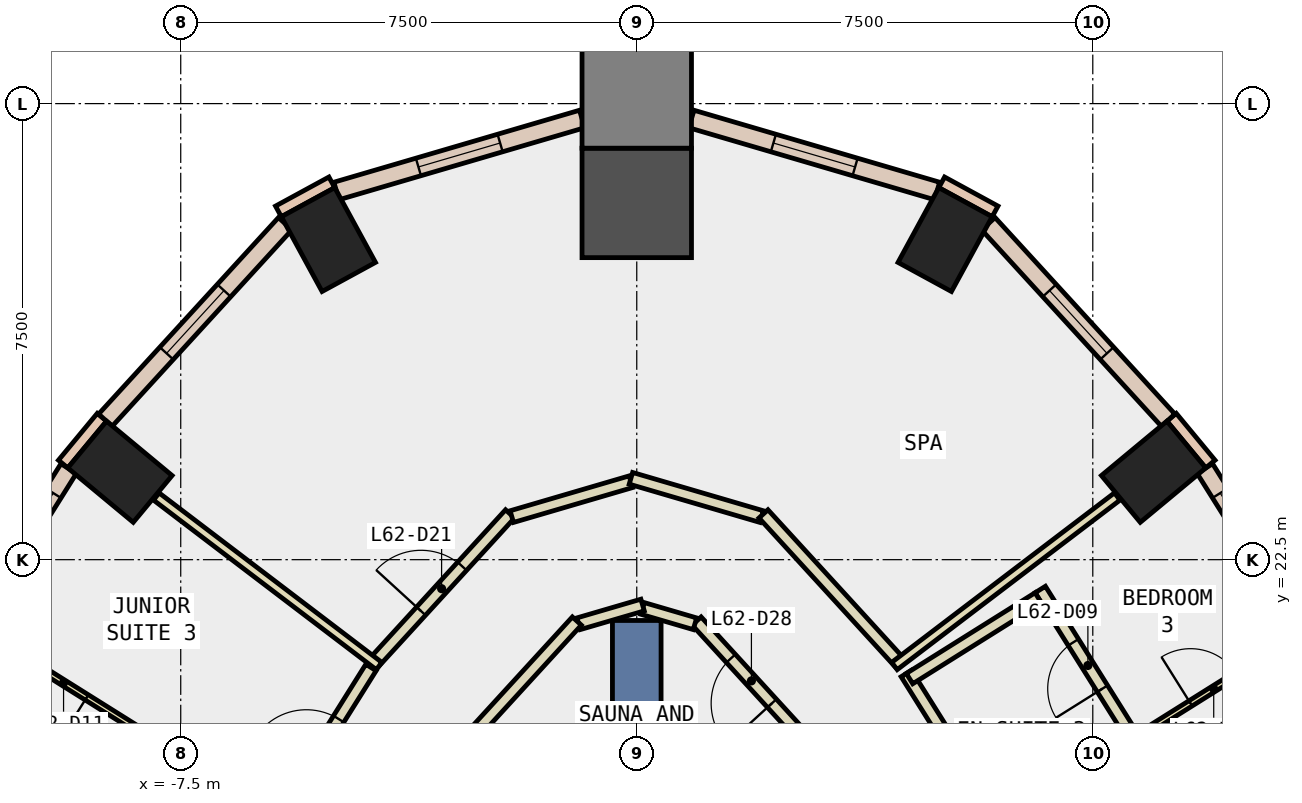
"""IFC4 building model, lengths in metres.
Left out: names, types, materials, properties, quantities, classifications, styles, units other than length and angle.
Written with IfcOpenShell. Run it as: python <this file> out.ifc"""

import sys

from ifc_helpers import new_model, si_unit, direction, frame, frame_2d, origin, origin_2d, place, context, subcontext, project, spatial, rectangle, extrude, element, fill, save


model = new_model("IFC4")
c1 = context("Model", 3, precision=1e-05, world=origin(), true_north=direction((0.0, 1.0)))
c2 = subcontext(c1, "Body", "Model", "MODEL_VIEW")
j1 = project(units=[si_unit("LENGTHUNIT", "METRE"), si_unit("PLANEANGLEUNIT", "RADIAN")], contexts=[c1])
p1 = place(None, origin())
s1 = spatial("IfcSite", under=j1, at=p1, CompositionType="ELEMENT")
p2 = place(p1, origin())
s2 = spatial("IfcBuilding", under=s1, at=p2, CompositionType="ELEMENT")
p3 = place(p2, frame((0.0, 0.0, 270.2)))
s3 = spatial("IfcBuildingStorey", under=s2, at=p3, CompositionType="ELEMENT", Elevation=270.2)
for number, where, z_axis, x_axis in (
    (1, (8.5, 23.946, -0.34), (0.0, 0.0, 1.0), (-0.639, 0.769, 0.0)),
    (2, (5.071, 27.764, -0.34), (0.0, 0.0, 1.0), (-0.878, 0.478, 0.0)),
):
    element("IfcColumn", number, at=place(p3, frame(where, z_axis=z_axis, x_axis=x_axis)), inside=s3, PredefinedType="COLUMN", context=c2, shape_type="SweptSolid", body=[
        extrude(rectangle(XDim=1.0, YDim=1.4, at=origin_2d()), origin(), (0.0, 0.0, 1.0), 3.6),
    ])
p4 = place(p3, frame((0.0, 28.367, -0.34), z_axis=(0.0, 0.0, 1.0), x_axis=(0.0, 1.0, 0.0)))
e3 = element("IfcColumn", 3, at=p4, inside=s3, PredefinedType="COLUMN", context=c2, shape_type="SweptSolid", body=[
    extrude(rectangle(XDim=1.8, YDim=1.8, at=origin_2d()), origin(), (0.0, 0.0, 1.0), 3.6),
])
for number, where, z_axis, x_axis in (
    (4, (-5.071, 27.764, -0.34), (0.0, 0.0, 1.0), (0.878, 0.478, 0.0)),
    (5, (-8.5, 23.946, -0.34), (0.0, 0.0, 1.0), (0.639, 0.769, 0.0)),
):
    element("IfcColumn", number, at=place(p3, frame(where, z_axis=z_axis, x_axis=x_axis)), inside=s3, PredefinedType="COLUMN", context=c2, shape_type="SweptSolid", body=[
        extrude(rectangle(XDim=1.0, YDim=1.4, at=origin_2d()), origin(), (0.0, 0.0, 1.0), 3.6),
    ])
p5 = place(p3, frame((0.0, 30.167, -0.34), z_axis=(0.0, 0.0, 1.0), x_axis=(0.0, 1.0, 0.0)))
e6 = element("IfcColumn", 6, at=p5, inside=s3, PredefinedType="COLUMN", context=c2, shape_type="SweptSolid", body=[
    extrude(rectangle(XDim=1.8, YDim=1.8, at=origin_2d()), origin(), (0.0, 0.0, 1.0), 3.6),
])
p6 = place(p3, frame((0.0, 12.5, -0.34), z_axis=(0.0, 0.0, 1.0), x_axis=(0.0, 1.0, 0.0)))
e7 = element("IfcWall", 7, at=p6, inside=s3, PredefinedType="SHEAR", context=c2, shape_type="SweptSolid", body=[
    extrude(rectangle(XDim=9.0, YDim=0.8, at=frame_2d((4.5, 0.0))), origin(), (0.0, 0.0, 1.0), 3.6),
])
for number, where, z_axis, x_axis in (
    (8, (5.893, 28.227, 0.0), (0.0, 0.0, 1.0), (-0.878, 0.478, 0.0)),
    (9, (-5.015, 28.705, 0.0), (0.0, 0.0, 1.0), (-0.878, -0.478, 0.0)),
):
    element("IfcWall", number, at=place(p3, frame(where, z_axis=z_axis, x_axis=x_axis)), inside=s3, PredefinedType="STANDARD", context=c2, shape_type="SweptSolid", body=[
        extrude(rectangle(XDim=1.0, YDim=0.2, at=frame_2d((0.5, 0.0))), origin(), (0.0, 0.0, 1.0), 3.26),
    ])
for number, where, z_axis, x_axis in (
    (10, (9.434, 24.072, 0.0), (0.0, 0.0, 1.0), (-0.638, 0.77, 0.0)),
    (11, (-8.796, 24.842, 0.0), (0.0, 0.0, 1.0), (-0.638, -0.77, 0.0)),
):
    element("IfcWall", number, at=place(p3, frame(where, z_axis=z_axis, x_axis=x_axis)), inside=s3, PredefinedType="STANDARD", context=c2, shape_type="SweptSolid", body=[
        extrude(rectangle(XDim=1.0, YDim=0.2, at=frame_2d((0.5, 0.0))), origin(), (0.0, 0.0, 1.0), 3.26),
    ])
p7 = place(p3, frame((12.372, 19.166, 0.0), z_axis=(0.0, 0.0, 1.0), x_axis=(-0.531137483242, 0.847285650708, 0.0)))
e12 = element("IfcWall", 12, at=p7, inside=s3, PredefinedType="STANDARD", context=c2, shape_type="SweptSolid", body=[
    extrude(rectangle(XDim=5.703, YDim=0.3, at=frame_2d((2.852, 0.0))), origin(), (0.0, 0.0, 1.0), 3.26),
])
p8 = place(p7, frame((0.476, 0.0, 0.9)))
e13 = element("IfcOpeningElement", 13, at=p8, cuts=e12, PredefinedType="OPENING", context=c2, shape_type="SweptSolid", body=[
    extrude(rectangle(XDim=1.9, YDim=2.0, at=frame_2d((0.95, 1.0))), frame((0.0, 0.16, 0.0), z_axis=(0.0, -1.0, 0.0), x_axis=(1.0, 0.0, 0.0)), (0.0, 0.0, 1.0), 0.32),
])
p9 = place(p7, frame((3.327, 0.0, 0.9)))
e14 = element("IfcOpeningElement", 14, at=p9, cuts=e12, PredefinedType="OPENING", context=c2, shape_type="SweptSolid", body=[
    extrude(rectangle(XDim=1.9, YDim=2.0, at=frame_2d((0.95, 1.0))), frame((0.0, 0.16, 0.0), z_axis=(0.0, -1.0, 0.0), x_axis=(1.0, 0.0, 0.0)), (0.0, 0.0, 1.0), 0.32),
])
p10 = place(p3, frame((8.739, 24.794, 0.0), z_axis=(0.0, 0.0, 1.0), x_axis=(-0.675143863554, 0.737686087374, 0.0)))
e15 = element("IfcWall", 15, at=p10, inside=s3, PredefinedType="STANDARD", context=c2, shape_type="SweptSolid", body=[
    extrude(rectangle(XDim=4.38, YDim=0.3, at=frame_2d((2.19, 0.0))), origin(), (0.0, 0.0, 1.0), 3.26),
])
p11 = place(p10, frame((1.49, 0.0, 0.9)))
e16 = element("IfcOpeningElement", 16, at=p11, cuts=e15, PredefinedType="OPENING", context=c2, shape_type="SweptSolid", body=[
    extrude(rectangle(XDim=1.4, YDim=2.0, at=frame_2d((0.7, 1.0))), frame((0.0, 0.16, 0.0), z_axis=(0.0, -1.0, 0.0), x_axis=(1.0, 0.0, 0.0)), (0.0, 0.0, 1.0), 0.32),
])
p12 = place(p3, frame((4.939, 28.563, 0.0), z_axis=(0.0, 0.0, 1.0), x_axis=(-0.959632861734, 0.281255703373, 0.0)))
e17 = element("IfcWall", 17, at=p12, inside=s3, PredefinedType="STANDARD", context=c2, shape_type="SweptSolid", body=[
    extrude(rectangle(XDim=4.21, YDim=0.3, at=frame_2d((2.105, 0.0))), origin(), (0.0, 0.0, 1.0), 3.26),
])
p13 = place(p12, frame((1.405, 0.0, 0.9)))
e18 = element("IfcOpeningElement", 18, at=p13, cuts=e17, PredefinedType="OPENING", context=c2, shape_type="SweptSolid", body=[
    extrude(rectangle(XDim=1.4, YDim=2.0, at=frame_2d((0.7, 1.0))), frame((0.0, 0.16, 0.0), z_axis=(0.0, -1.0, 0.0), x_axis=(1.0, 0.0, 0.0)), (0.0, 0.0, 1.0), 0.32),
])
p14 = place(p3, frame((-0.899, 29.747, 0.0), z_axis=(0.0, 0.0, 1.0), x_axis=(-0.959632861734, -0.281255703373, 0.0)))
e19 = element("IfcWall", 19, at=p14, inside=s3, PredefinedType="STANDARD", context=c2, shape_type="SweptSolid", body=[
    extrude(rectangle(XDim=4.21, YDim=0.3, at=frame_2d((2.105, 0.0))), origin(), (0.0, 0.0, 1.0), 3.26),
])
p15 = place(p14, frame((1.405, 0.0, 0.9)))
e20 = element("IfcOpeningElement", 20, at=p15, cuts=e19, PredefinedType="OPENING", context=c2, shape_type="SweptSolid", body=[
    extrude(rectangle(XDim=1.4, YDim=2.0, at=frame_2d((0.7, 1.0))), frame((0.0, 0.16, 0.0), z_axis=(0.0, -1.0, 0.0), x_axis=(1.0, 0.0, 0.0)), (0.0, 0.0, 1.0), 0.32),
])
p16 = place(p3, frame((-5.782, 28.025, 0.0), z_axis=(0.0, 0.0, 1.0), x_axis=(-0.675143863554, -0.737686087374, 0.0)))
e21 = element("IfcWall", 21, at=p16, inside=s3, PredefinedType="STANDARD", context=c2, shape_type="SweptSolid", body=[
    extrude(rectangle(XDim=4.38, YDim=0.3, at=frame_2d((2.19, 0.0))), origin(), (0.0, 0.0, 1.0), 3.26),
])
p17 = place(p16, frame((1.49, 0.0, 0.9)))
e22 = element("IfcOpeningElement", 22, at=p17, cuts=e21, PredefinedType="OPENING", context=c2, shape_type="SweptSolid", body=[
    extrude(rectangle(XDim=1.4, YDim=2.0, at=frame_2d((0.7, 1.0))), frame((0.0, 0.16, 0.0), z_axis=(0.0, -1.0, 0.0), x_axis=(1.0, 0.0, 0.0)), (0.0, 0.0, 1.0), 0.32),
])
p18 = place(p3, frame((-9.343, 23.998, 0.0), z_axis=(0.0, 0.0, 1.0), x_axis=(-0.531137483242, -0.847285650708, 0.0)))
e23 = element("IfcWall", 23, at=p18, inside=s3, PredefinedType="STANDARD", context=c2, shape_type="SweptSolid", body=[
    extrude(rectangle(XDim=5.703, YDim=0.3, at=frame_2d((2.852, 0.0))), origin(), (0.0, 0.0, 1.0), 3.26),
])
p19 = place(p18, frame((0.476, 0.0, 0.9)))
e24 = element("IfcOpeningElement", 24, at=p19, cuts=e23, PredefinedType="OPENING", context=c2, shape_type="SweptSolid", body=[
    extrude(rectangle(XDim=1.9, YDim=2.0, at=frame_2d((0.95, 1.0))), frame((0.0, 0.16, 0.0), z_axis=(0.0, -1.0, 0.0), x_axis=(1.0, 0.0, 0.0)), (0.0, 0.0, 1.0), 0.32),
])
p20 = place(p18, frame((3.327, 0.0, 0.9)))
e25 = element("IfcOpeningElement", 25, at=p20, cuts=e23, PredefinedType="OPENING", context=c2, shape_type="SweptSolid", body=[
    extrude(rectangle(XDim=1.9, YDim=2.0, at=frame_2d((0.95, 1.0))), frame((0.0, 0.16, 0.0), z_axis=(0.0, -1.0, 0.0), x_axis=(1.0, 0.0, 0.0)), (0.0, 0.0, 1.0), 0.32),
])
p21 = place(p3, frame((2.787, 19.522, 0.0), z_axis=(0.0, 0.0, 1.0), x_axis=(-0.675132105979, 0.73769684795, 0.0)))
e26 = element("IfcWall", 26, at=p21, inside=s3, PredefinedType="PARTITIONING", context=c2, shape_type="SweptSolid", body=[
    extrude(rectangle(XDim=2.669, YDim=0.2, at=frame_2d((1.334, 0.0))), origin(), (0.0, 0.0, 1.0), 3.26),
])
p22 = place(p21, frame((0.835, 0.0, 0.0)))
e27 = element("IfcOpeningElement", 27, at=p22, cuts=e26, PredefinedType="OPENING", context=c2, shape_type="SweptSolid", body=[
    extrude(rectangle(XDim=1.0, YDim=2.1, at=frame_2d((0.5, 1.05))), frame((0.0, 0.11, 0.0), z_axis=(0.0, -1.0, 0.0), x_axis=(1.0, 0.0, 0.0)), (0.0, 0.0, 1.0), 0.22),
])
p23 = place(p3, frame((0.957, 21.446, 0.0), z_axis=(0.0, 0.0, 1.0), x_axis=(-0.959758875404, 0.28082539252, 0.0)))
e28 = element("IfcWall", 28, at=p23, inside=s3, PredefinedType="PARTITIONING", context=c2, shape_type="SweptSolid", body=[
    extrude(rectangle(XDim=0.897, YDim=0.2, at=frame_2d((0.449, 0.0))), origin(), (0.0, 0.0, 1.0), 3.26),
])
p24 = place(p3, frame((0.096, 21.754, 0.0), z_axis=(0.0, 0.0, 1.0), x_axis=(-0.959817848073, -0.280623766849, 0.0)))
e29 = element("IfcWall", 29, at=p24, inside=s3, PredefinedType="PARTITIONING", context=c2, shape_type="SweptSolid", body=[
    extrude(rectangle(XDim=1.097, YDim=0.2, at=frame_2d((0.549, 0.0))), origin(), (0.0, 0.0, 1.0), 3.26),
])
p25 = place(p3, frame((-0.985, 21.491, 0.0), z_axis=(0.0, 0.0, 1.0), x_axis=(-0.675132105979, -0.73769684795, 0.0)))
e30 = element("IfcWall", 30, at=p25, inside=s3, PredefinedType="PARTITIONING", context=c2, shape_type="SweptSolid", body=[
    extrude(rectangle(XDim=2.669, YDim=0.2, at=frame_2d((1.334, 0.0))), origin(), (0.0, 0.0, 1.0), 3.26),
])
p26 = place(p3, frame((4.433, 20.628, 0.0), z_axis=(0.0, 0.0, 1.0), x_axis=(0.531135189756, -0.84728708842, 0.0)))
e31 = element("IfcWall", 31, at=p26, inside=s3, PredefinedType="PARTITIONING", context=c2, shape_type="SweptSolid", body=[
    extrude(rectangle(XDim=2.799, YDim=0.2, at=frame_2d((1.4, 0.0))), origin(), (0.0, 0.0, 1.0), 3.26),
])
p27 = place(p3, frame((-4.335, 20.793, 0.0), z_axis=(0.0, 0.0, 1.0), x_axis=(0.675074517272, 0.737749548377, 0.0)))
e32 = element("IfcWall", 32, at=p27, inside=s3, PredefinedType="PARTITIONING", context=c2, shape_type="SweptSolid", body=[
    extrude(rectangle(XDim=3.334, YDim=0.2, at=frame_2d((1.667, 0.0))), origin(), (0.0, 0.0, 1.0), 3.26),
])
p28 = place(p27, frame((1.167, 0.0, 0.0)))
e33 = element("IfcOpeningElement", 33, at=p28, cuts=e32, PredefinedType="OPENING", context=c2, shape_type="SweptSolid", body=[
    extrude(rectangle(XDim=1.0, YDim=2.1, at=frame_2d((0.5, 1.05))), frame((0.0, 0.11, 0.0), z_axis=(0.0, -1.0, 0.0), x_axis=(1.0, 0.0, 0.0)), (0.0, 0.0, 1.0), 0.22),
])
p29 = place(p3, frame((-2.055, 23.208, 0.0), z_axis=(0.0, 0.0, 1.0), x_axis=(0.959656367963, 0.281175488669, 0.0)))
e34 = element("IfcWall", 34, at=p29, inside=s3, PredefinedType="PARTITIONING", context=c2, shape_type="SweptSolid", body=[
    extrude(rectangle(XDim=2.041, YDim=0.2, at=frame_2d((1.021, 0.0))), origin(), (0.0, 0.0, 1.0), 3.26),
])
p30 = place(p3, frame((-0.096, 23.838, 0.0), z_axis=(0.0, 0.0, 1.0), x_axis=(0.959694419707, -0.281045584886, 0.0)))
e35 = element("IfcWall", 35, at=p30, inside=s3, PredefinedType="PARTITIONING", context=c2, shape_type="SweptSolid", body=[
    extrude(rectangle(XDim=2.241, YDim=0.2, at=frame_2d((1.121, 0.0))), origin(), (0.0, 0.0, 1.0), 3.26),
])
p31 = place(p3, frame((2.084, 23.253, 0.0), z_axis=(0.0, 0.0, 1.0), x_axis=(0.675074517272, -0.737749548377, 0.0)))
e36 = element("IfcWall", 36, at=p31, inside=s3, PredefinedType="PARTITIONING", context=c2, shape_type="SweptSolid", body=[
    extrude(rectangle(XDim=3.334, YDim=0.2, at=frame_2d((1.667, 0.0))), origin(), (0.0, 0.0, 1.0), 3.26),
])
p32 = place(p3, frame((-5.965, 18.185, 0.0), z_axis=(0.0, 0.0, 1.0), x_axis=(0.531256372055, 0.847211111324, 0.0)))
e37 = element("IfcWall", 37, at=p32, inside=s3, PredefinedType="PARTITIONING", context=c2, shape_type="SweptSolid", body=[
    extrude(rectangle(XDim=3.0, YDim=0.2, at=frame_2d((1.5, 0.0))), origin(), (0.0, 0.0, 1.0), 3.26),
])
p33 = place(p32, frame((1.0, 0.0, 0.0)))
e38 = element("IfcOpeningElement", 38, at=p33, cuts=e37, PredefinedType="OPENING", context=c2, shape_type="SweptSolid", body=[
    extrude(rectangle(XDim=1.0, YDim=2.1, at=frame_2d((0.5, 1.05))), frame((0.0, 0.11, 0.0), z_axis=(0.0, -1.0, 0.0), x_axis=(1.0, 0.0, 0.0)), (0.0, 0.0, 1.0), 0.22),
])
p34 = place(p3, frame((8.091, 19.499, 0.0), z_axis=(0.0, 0.0, 1.0), x_axis=(0.847249319986, 0.53119543464, 0.0)))
e39 = element("IfcWall", 39, at=p34, inside=s3, PredefinedType="PARTITIONING", context=c2, shape_type="SweptSolid", body=[
    extrude(rectangle(XDim=3.3, YDim=0.1, at=frame_2d((1.65, 0.0))), origin(), (0.0, 0.0, 1.0), 3.26),
])
p35 = place(p34, frame((1.2, 0.0, 0.0)))
e40 = element("IfcOpeningElement", 40, at=p35, cuts=e39, PredefinedType="OPENING", context=c2, shape_type="SweptSolid", body=[
    extrude(rectangle(XDim=0.9, YDim=2.1, at=frame_2d((0.45, 1.05))), frame((0.0, 0.06, 0.0), z_axis=(0.0, -1.0, 0.0), x_axis=(1.0, 0.0, 0.0)), (0.0, 0.0, 1.0), 0.12),
])
p36 = place(p3, frame((8.203, 19.51, 0.0), z_axis=(0.0, 0.0, 1.0), x_axis=(-0.531218552952, 0.847234825181, 0.0)))
e41 = element("IfcWall", 41, at=p36, inside=s3, PredefinedType="PARTITIONING", context=c2, shape_type="SweptSolid", body=[
    extrude(rectangle(XDim=2.95, YDim=0.2, at=frame_2d((1.475, 0.0))), origin(), (0.0, 0.0, 1.0), 3.26),
])
p37 = place(p36, frame((1.025, 0.0, 0.0)))
e42 = element("IfcOpeningElement", 42, at=p37, cuts=e41, PredefinedType="OPENING", context=c2, shape_type="SweptSolid", body=[
    extrude(rectangle(XDim=0.9, YDim=2.1, at=frame_2d((0.45, 1.05))), frame((0.0, 0.11, 0.0), z_axis=(0.0, -1.0, 0.0), x_axis=(1.0, 0.0, 0.0)), (0.0, 0.0, 1.0), 0.22),
])
p38 = place(p3, frame((6.604, 21.871, 0.0), z_axis=(0.0, 0.0, 1.0), x_axis=(-0.847377617561, -0.530990746866, 0.0)))
e43 = element("IfcWall", 43, at=p38, inside=s3, PredefinedType="PARTITIONING", context=c2, shape_type="SweptSolid", body=[
    extrude(rectangle(XDim=2.499, YDim=0.2, at=frame_2d((1.25, 0.0))), origin(), (0.0, 0.0, 1.0), 3.26),
])
for number, where, z_axis, x_axis in (
    (44, (4.238, 20.751, 0.0), (0.0, 0.0, 1.0), (0.796, 0.606, 0.0)),
    (45, (-4.238, 20.751, 0.0), (0.0, 0.0, 1.0), (-0.796, 0.606, 0.0)),
):
    element("IfcWall", number, at=place(p3, frame(where, z_axis=z_axis, x_axis=x_axis)), inside=s3, PredefinedType="PARTITIONING", context=c2, shape_type="SweptSolid", body=[
        extrude(rectangle(XDim=4.604, YDim=0.15, at=frame_2d((2.302, 0.0))), origin(), (0.0, 0.0, 1.0), 3.26),
    ])
p39 = place(p3, frame((-8.029, 19.598, 0.0), z_axis=(0.0, 0.0, 1.0), x_axis=(-0.847216023371, 0.531248538581, 0.0)))
e46 = element("IfcWall", 46, at=p39, inside=s3, PredefinedType="PARTITIONING", context=c2, shape_type="SweptSolid", body=[
    extrude(rectangle(XDim=3.3, YDim=0.1, at=frame_2d((1.65, 0.0))), origin(), (0.0, 0.0, 1.0), 3.26),
])
p40 = place(p39, frame((1.2, 0.0, 0.0)))
e47 = element("IfcOpeningElement", 47, at=p40, cuts=e46, PredefinedType="OPENING", context=c2, shape_type="SweptSolid", body=[
    extrude(rectangle(XDim=0.9, YDim=2.1, at=frame_2d((0.45, 1.05))), frame((0.0, 0.06, 0.0), z_axis=(0.0, -1.0, 0.0), x_axis=(1.0, 0.0, 0.0)), (0.0, 0.0, 1.0), 0.12),
])
p41 = place(p9, origin())
e48 = element("IfcWindow", 48, at=p41, inside=s3, PartitioningType="SINGLE_PANEL", PredefinedType="WINDOW", context=c2, shape_type="SweptSolid", body=[
    extrude(rectangle(XDim=1.9, YDim=2.0, at=frame_2d((0.95, 1.0))), frame((0.0, 0.03, 0.0), z_axis=(0.0, -1.0, 0.0), x_axis=(1.0, 0.0, 0.0)), (0.0, 0.0, 1.0), 0.06),
])
fill(e14, e48)
p42 = place(p11, origin())
e49 = element("IfcWindow", 49, at=p42, inside=s3, PartitioningType="SINGLE_PANEL", PredefinedType="WINDOW", context=c2, shape_type="SweptSolid", body=[
    extrude(rectangle(XDim=1.4, YDim=2.0, at=frame_2d((0.7, 1.0))), frame((0.0, 0.03, 0.0), z_axis=(0.0, -1.0, 0.0), x_axis=(1.0, 0.0, 0.0)), (0.0, 0.0, 1.0), 0.06),
])
fill(e16, e49)
p43 = place(p13, origin())
e50 = element("IfcWindow", 50, at=p43, inside=s3, PartitioningType="SINGLE_PANEL", PredefinedType="WINDOW", context=c2, shape_type="SweptSolid", body=[
    extrude(rectangle(XDim=1.4, YDim=2.0, at=frame_2d((0.7, 1.0))), frame((0.0, 0.03, 0.0), z_axis=(0.0, -1.0, 0.0), x_axis=(1.0, 0.0, 0.0)), (0.0, 0.0, 1.0), 0.06),
])
fill(e18, e50)
p44 = place(p15, origin())
e51 = element("IfcWindow", 51, at=p44, inside=s3, PartitioningType="SINGLE_PANEL", PredefinedType="WINDOW", context=c2, shape_type="SweptSolid", body=[
    extrude(rectangle(XDim=1.4, YDim=2.0, at=frame_2d((0.7, 1.0))), frame((0.0, 0.03, 0.0), z_axis=(0.0, -1.0, 0.0), x_axis=(1.0, 0.0, 0.0)), (0.0, 0.0, 1.0), 0.06),
])
fill(e20, e51)
p45 = place(p17, origin())
e52 = element("IfcWindow", 52, at=p45, inside=s3, PartitioningType="SINGLE_PANEL", PredefinedType="WINDOW", context=c2, shape_type="SweptSolid", body=[
    extrude(rectangle(XDim=1.4, YDim=2.0, at=frame_2d((0.7, 1.0))), frame((0.0, 0.03, 0.0), z_axis=(0.0, -1.0, 0.0), x_axis=(1.0, 0.0, 0.0)), (0.0, 0.0, 1.0), 0.06),
])
fill(e22, e52)
p46 = place(p19, origin())
e53 = element("IfcWindow", 53, at=p46, inside=s3, PartitioningType="SINGLE_PANEL", PredefinedType="WINDOW", context=c2, shape_type="SweptSolid", body=[
    extrude(rectangle(XDim=1.9, YDim=2.0, at=frame_2d((0.95, 1.0))), frame((0.0, 0.03, 0.0), z_axis=(0.0, -1.0, 0.0), x_axis=(1.0, 0.0, 0.0)), (0.0, 0.0, 1.0), 0.06),
])
fill(e24, e53)
p47 = place(p35, origin())
e54 = element("IfcDoor", 54, at=p47, inside=s3, OperationType="SINGLE_SWING_LEFT", PredefinedType="DOOR", context=c2, shape_type="SweptSolid", body=[
    extrude(rectangle(XDim=0.9, YDim=2.1, at=frame_2d((0.45, 1.05))), frame((0.0, 0.025, 0.0), z_axis=(0.0, -1.0, 0.0), x_axis=(1.0, 0.0, 0.0)), (0.0, 0.0, 1.0), 0.05),
])
fill(e40, e54)
p48 = place(p37, origin())
e55 = element("IfcDoor", 55, at=p48, inside=s3, OperationType="SINGLE_SWING_RIGHT", PredefinedType="DOOR", context=c2, shape_type="SweptSolid", body=[
    extrude(rectangle(XDim=0.9, YDim=2.1, at=frame_2d((0.45, 1.05))), frame((0.0, 0.025, 0.0), z_axis=(0.0, -1.0, 0.0), x_axis=(1.0, 0.0, 0.0)), (0.0, 0.0, 1.0), 0.05),
])
fill(e42, e55)
p49 = place(p33, origin())
e56 = element("IfcDoor", 56, at=p49, inside=s3, OperationType="SINGLE_SWING_LEFT", PredefinedType="DOOR", context=c2, shape_type="SweptSolid", body=[
    extrude(rectangle(XDim=1.0, YDim=2.1, at=frame_2d((0.5, 1.05))), frame((0.0, 0.025, 0.0), z_axis=(0.0, -1.0, 0.0), x_axis=(1.0, 0.0, 0.0)), (0.0, 0.0, 1.0), 0.05),
])
fill(e38, e56)
p50 = place(p40, origin())
e57 = element("IfcDoor", 57, at=p50, inside=s3, OperationType="SINGLE_SWING_RIGHT", PredefinedType="DOOR", context=c2, shape_type="SweptSolid", body=[
    extrude(rectangle(XDim=0.9, YDim=2.1, at=frame_2d((0.45, 1.05))), frame((0.0, 0.025, 0.0), z_axis=(0.0, -1.0, 0.0), x_axis=(1.0, 0.0, 0.0)), (0.0, 0.0, 1.0), 0.05),
])
fill(e47, e57)
p51 = place(p28, origin())
e58 = element("IfcDoor", 58, at=p51, inside=s3, OperationType="SINGLE_SWING_LEFT", PredefinedType="DOOR", context=c2, shape_type="SweptSolid", body=[
    extrude(rectangle(XDim=1.0, YDim=2.1, at=frame_2d((0.5, 1.05))), frame((0.0, 0.025, 0.0), z_axis=(0.0, -1.0, 0.0), x_axis=(1.0, 0.0, 0.0)), (0.0, 0.0, 1.0), 0.05),
])
fill(e33, e58)
p52 = place(p22, origin())
e59 = element("IfcDoor", 59, at=p52, inside=s3, OperationType="SINGLE_SWING_LEFT", PredefinedType="DOOR", context=c2, shape_type="SweptSolid", body=[
    extrude(rectangle(XDim=1.0, YDim=2.1, at=frame_2d((0.5, 1.05))), frame((0.0, 0.025, 0.0), z_axis=(0.0, -1.0, 0.0), x_axis=(1.0, 0.0, 0.0)), (0.0, 0.0, 1.0), 0.05),
])
fill(e27, e59)
save(model, sys.argv[1])
